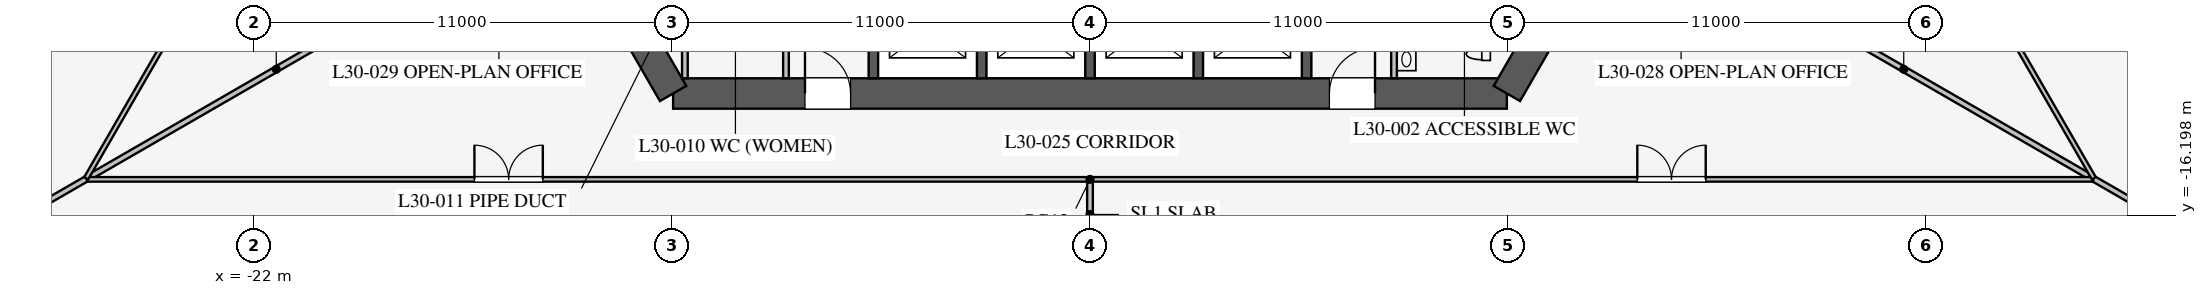
"""IFC4 building model, lengths in metres.
Left out: names, types, materials, properties, quantities, classifications, styles, units other than length and angle.
Written with IfcOpenShell. Run it as: python <this file> out.ifc"""

import sys

from ifc_helpers import new_model, si_unit, direction, frame, frame_2d, origin, place, context, subcontext, project, spatial, rectangle, extrude, element, fill, save


model = new_model("IFC4")
c1 = context("Model", 3, precision=1e-05, world=origin(), true_north=direction((0.0, 1.0)))
c2 = subcontext(c1, "Body", "Model", "MODEL_VIEW")
j1 = project(units=[si_unit("LENGTHUNIT", "METRE"), si_unit("PLANEANGLEUNIT", "RADIAN")], contexts=[c1])
p1 = place(None, origin())
s1 = spatial("IfcSite", under=j1, at=p1, CompositionType="ELEMENT")
p2 = place(p1, origin())
s2 = spatial("IfcBuilding", under=s1, at=p2, CompositionType="ELEMENT")
p3 = place(p2, frame((0.0, 0.0, 132.5)))
s3 = spatial("IfcBuildingStorey", under=s2, at=p3, CompositionType="ELEMENT", Elevation=132.5)
p4 = place(p3, frame((-10.97, -13.0, 0.0), z_axis=(0.0, 0.0, 1.0), x_axis=(1.0, 0.0, 0.0)))
e1 = element("IfcWall", 1, at=p4, inside=s3, PredefinedType="SHEAR", context=c2, shape_type="SweptSolid", body=[
    extrude(rectangle(XDim=21.939, YDim=0.8, at=frame_2d((10.97, 0.0))), origin(), (0.0, 0.0, 1.0), 4.2),
])
p5 = place(p4, frame((17.27, 0.0, 0.0)))
e2 = element("IfcOpeningElement", 2, at=p5, cuts=e1, PredefinedType="OPENING", context=c2, shape_type="SweptSolid", body=[
    extrude(rectangle(XDim=1.2, YDim=2.1, at=frame_2d((0.6, 1.05))), frame((0.0, 0.41, 0.0), z_axis=(0.0, -1.0, 0.0), x_axis=(1.0, 0.0, 0.0)), (0.0, 0.0, 1.0), 0.82),
])
p6 = place(p4, frame((3.47, 0.0, 0.0)))
e3 = element("IfcOpeningElement", 3, at=p6, cuts=e1, PredefinedType="OPENING", context=c2, shape_type="SweptSolid", body=[
    extrude(rectangle(XDim=1.2, YDim=2.1, at=frame_2d((0.6, 1.05))), frame((0.0, 0.41, 0.0), z_axis=(0.0, -1.0, 0.0), x_axis=(1.0, 0.0, 0.0)), (0.0, 0.0, 1.0), 0.82),
])
for number, where, z_axis, x_axis in (
    (4, (10.97, -13.0, 0.0), (0.0, 0.0, 1.0), (0.5, 0.866, 0.0)),
    (5, (-16.743, -3.0, 0.0), (0.0, 0.0, 1.0), (0.5, -0.866, 0.0)),
):
    element("IfcWall", number, at=place(p3, frame(where, z_axis=z_axis, x_axis=x_axis)), inside=s3, PredefinedType="SHEAR", context=c2, shape_type="SweptSolid", body=[
        extrude(rectangle(XDim=11.547, YDim=0.8, at=frame_2d((5.773, 0.0))), origin(), (0.0, 0.0, 1.0), 4.2),
    ])
for number, where, z_axis, x_axis in (
    (6, (-5.7, -10.025, 0.0), (0.0, 0.0, 1.0), (0.0, -1.0, 0.0)),
    (7, (-2.85, -10.025, 0.0), (0.0, 0.0, 1.0), (0.0, -1.0, 0.0)),
    (8, (0.0, -10.025, 0.0), (0.0, 0.0, 1.0), (0.0, -1.0, 0.0)),
    (9, (2.85, -10.025, 0.0), (0.0, 0.0, 1.0), (0.0, -1.0, 0.0)),
    (10, (5.7, -10.025, 0.0), (0.0, 0.0, 1.0), (0.0, -1.0, 0.0)),
):
    element("IfcWall", number, at=place(p3, frame(where, z_axis=z_axis, x_axis=x_axis)), inside=s3, PredefinedType="SHEAR", context=c2, shape_type="SweptSolid", body=[
        extrude(rectangle(XDim=2.575, YDim=0.25, at=frame_2d((1.288, 0.0))), origin(), (0.0, 0.0, 1.0), 4.2),
    ])
p7 = place(p3, frame((8.0, -7.5, 0.0), z_axis=(0.0, 0.0, 1.0), x_axis=(0.0, -1.0, 0.0)))
e11 = element("IfcWall", 11, at=p7, inside=s3, PredefinedType="PARTITIONING", context=c2, shape_type="SweptSolid", body=[
    extrude(rectangle(XDim=5.1, YDim=0.15, at=frame_2d((2.55, 0.0))), origin(), (0.0, 0.0, 1.0), 4.0),
])
p8 = place(p7, frame((2.6, 0.0, 0.0)))
e12 = element("IfcOpeningElement", 12, at=p8, cuts=e11, PredefinedType="OPENING", context=c2, shape_type="SweptSolid", body=[
    extrude(rectangle(XDim=0.9, YDim=2.1, at=frame_2d((0.45, 1.05))), frame((0.0, 0.085, 0.0), z_axis=(0.0, -1.0, 0.0), x_axis=(1.0, 0.0, 0.0)), (0.0, 0.0, 1.0), 0.17),
])
p9 = place(p3, frame((-8.0, -7.5, 0.0), z_axis=(0.0, 0.0, 1.0), x_axis=(0.0, -1.0, 0.0)))
e13 = element("IfcWall", 13, at=p9, inside=s3, PredefinedType="PARTITIONING", context=c2, shape_type="SweptSolid", body=[
    extrude(rectangle(XDim=5.1, YDim=0.15, at=frame_2d((2.55, 0.0))), origin(), (0.0, 0.0, 1.0), 4.0),
])
p10 = place(p9, frame((2.6, 0.0, 0.0)))
e14 = element("IfcOpeningElement", 14, at=p10, cuts=e13, PredefinedType="OPENING", context=c2, shape_type="SweptSolid", body=[
    extrude(rectangle(XDim=0.9, YDim=2.1, at=frame_2d((0.45, 1.05))), frame((0.0, 0.085, 0.0), z_axis=(0.0, -1.0, 0.0), x_axis=(1.0, 0.0, 0.0)), (0.0, 0.0, 1.0), 0.17),
])
p11 = place(p3, frame((-10.66, -8.5, 0.0), z_axis=(0.0, 0.0, 1.0), x_axis=(0.0, -1.0, 0.0)))
e15 = element("IfcWall", 15, at=p11, inside=s3, PredefinedType="PARTITIONING", context=c2, shape_type="SweptSolid", body=[
    extrude(rectangle(XDim=4.1, YDim=0.15, at=frame_2d((2.05, 0.0))), origin(), (0.0, 0.0, 1.0), 4.0),
])
for number, where, z_axis, x_axis in (
    (16, (14.203, -8.2, 0.0), (0.0, 0.0, 1.0), (0.866, -0.5, 0.0)),
    (17, (-14.203, -8.2, 0.0), (0.0, 0.0, 1.0), (-0.866, -0.5, 0.0)),
):
    element("IfcWall", number, at=place(p3, frame(where, z_axis=z_axis, x_axis=x_axis)), inside=s3, PredefinedType="PARTITIONING", context=c2, shape_type="SweptSolid", body=[
        extrude(rectangle(XDim=16.65, YDim=0.15, at=frame_2d((8.325, 0.0))), origin(), (0.0, 0.0, 1.0), 2.3),
    ])
p12 = place(p3, frame((0.0, -15.32, 0.0), z_axis=(0.0, 0.0, 1.0), x_axis=(0.0, -1.0, 0.0)))
e18 = element("IfcWall", 18, at=p12, inside=s3, PredefinedType="PARTITIONING", context=c2, shape_type="SweptSolid", body=[
    extrude(rectangle(XDim=9.65, YDim=0.15, at=frame_2d((4.825, 0.0))), origin(), (0.0, 0.0, 1.0), 3.2),
])
p13 = place(p3, frame((-26.398, -15.26, 0.0), z_axis=(0.0, 0.0, 1.0), x_axis=(1.0, 0.0, 0.0)))
e19 = element("IfcWall", 19, at=p13, inside=s3, PredefinedType="PARTITIONING", context=c2, shape_type="SweptSolid", body=[
    extrude(rectangle(XDim=52.796, YDim=0.12, at=frame_2d((26.398, 0.0))), origin(), (0.0, 0.0, 1.0), 2.9),
])
p14 = place(p13, frame((10.2, 0.0, 0.15)))
e20 = element("IfcOpeningElement", 20, at=p14, cuts=e19, PredefinedType="OPENING", context=c2, shape_type="SweptSolid", body=[
    extrude(rectangle(XDim=1.8, YDim=2.1, at=frame_2d((0.9, 1.05))), frame((0.0, 0.07, 0.0), z_axis=(0.0, -1.0, 0.0), x_axis=(1.0, 0.0, 0.0)), (0.0, 0.0, 1.0), 0.14),
])
p15 = place(p13, frame((40.8, 0.0, 0.15)))
e21 = element("IfcOpeningElement", 21, at=p15, cuts=e19, PredefinedType="OPENING", context=c2, shape_type="SweptSolid", body=[
    extrude(rectangle(XDim=1.8, YDim=2.1, at=frame_2d((0.9, 1.05))), frame((0.0, 0.07, 0.0), z_axis=(0.0, -1.0, 0.0), x_axis=(1.0, 0.0, 0.0)), (0.0, 0.0, 1.0), 0.14),
])
p16 = place(p3, frame((26.415, -15.231, 0.0), z_axis=(0.0, 0.0, 1.0), x_axis=(-0.50000091641, 0.866024874695, 0.0)))
e22 = element("IfcWall", 22, at=p16, inside=s3, PredefinedType="PARTITIONING", context=c2, shape_type="SweptSolid", body=[
    extrude(rectangle(XDim=52.796, YDim=0.12, at=frame_2d((26.398, 0.0))), origin(), (0.0, 0.0, 1.0), 2.9),
])
p17 = place(p16, frame((10.2, 0.0, 0.15)))
e23 = element("IfcOpeningElement", 23, at=p17, cuts=e22, PredefinedType="OPENING", context=c2, shape_type="SweptSolid", body=[
    extrude(rectangle(XDim=1.8, YDim=2.1, at=frame_2d((0.9, 1.05))), frame((0.0, 0.07, 0.0), z_axis=(0.0, -1.0, 0.0), x_axis=(1.0, 0.0, 0.0)), (0.0, 0.0, 1.0), 0.14),
])
p18 = place(p16, frame((40.8, 0.0, 0.15)))
e24 = element("IfcOpeningElement", 24, at=p18, cuts=e22, PredefinedType="OPENING", context=c2, shape_type="SweptSolid", body=[
    extrude(rectangle(XDim=1.8, YDim=2.1, at=frame_2d((0.9, 1.05))), frame((0.0, 0.07, 0.0), z_axis=(0.0, -1.0, 0.0), x_axis=(1.0, 0.0, 0.0)), (0.0, 0.0, 1.0), 0.14),
])
p19 = place(p3, frame((-0.016, 30.491, 0.0), z_axis=(0.0, 0.0, 1.0), x_axis=(-0.50000091641, -0.866024874695, 0.0)))
e25 = element("IfcWall", 25, at=p19, inside=s3, PredefinedType="PARTITIONING", context=c2, shape_type="SweptSolid", body=[
    extrude(rectangle(XDim=52.796, YDim=0.12, at=frame_2d((26.398, 0.0))), origin(), (0.0, 0.0, 1.0), 2.9),
])
p20 = place(p19, frame((10.2, 0.0, 0.15)))
e26 = element("IfcOpeningElement", 26, at=p20, cuts=e25, PredefinedType="OPENING", context=c2, shape_type="SweptSolid", body=[
    extrude(rectangle(XDim=1.8, YDim=2.1, at=frame_2d((0.9, 1.05))), frame((0.0, 0.07, 0.0), z_axis=(0.0, -1.0, 0.0), x_axis=(1.0, 0.0, 0.0)), (0.0, 0.0, 1.0), 0.14),
])
p21 = place(p19, frame((40.8, 0.0, 0.15)))
e27 = element("IfcOpeningElement", 27, at=p21, cuts=e25, PredefinedType="OPENING", context=c2, shape_type="SweptSolid", body=[
    extrude(rectangle(XDim=1.8, YDim=2.1, at=frame_2d((0.9, 1.05))), frame((0.0, 0.07, 0.0), z_axis=(0.0, -1.0, 0.0), x_axis=(1.0, 0.0, 0.0)), (0.0, 0.0, 1.0), 0.14),
])
p22 = place(p5, origin())
e28 = element("IfcDoor", 28, at=p22, inside=s3, OperationType="SINGLE_SWING_RIGHT", PredefinedType="DOOR", context=c2, shape_type="SweptSolid", body=[
    extrude(rectangle(XDim=1.2, YDim=2.1, at=frame_2d((0.6, 1.05))), frame((0.0, 0.025, 0.0), z_axis=(0.0, -1.0, 0.0), x_axis=(1.0, 0.0, 0.0)), (0.0, 0.0, 1.0), 0.05),
])
fill(e2, e28)
p23 = place(p6, origin())
e29 = element("IfcDoor", 29, at=p23, inside=s3, OperationType="SINGLE_SWING_LEFT", PredefinedType="DOOR", context=c2, shape_type="SweptSolid", body=[
    extrude(rectangle(XDim=1.2, YDim=2.1, at=frame_2d((0.6, 1.05))), frame((0.0, 0.025, 0.0), z_axis=(0.0, -1.0, 0.0), x_axis=(1.0, 0.0, 0.0)), (0.0, 0.0, 1.0), 0.05),
])
fill(e3, e29)
p24 = place(p14, origin())
e30 = element("IfcDoor", 30, at=p24, inside=s3, OperationType="DOUBLE_DOOR_SINGLE_SWING", PredefinedType="DOOR", context=c2, shape_type="SweptSolid", body=[
    extrude(rectangle(XDim=1.8, YDim=2.1, at=frame_2d((0.9, 1.05))), frame((0.0, 0.025, 0.0), z_axis=(0.0, -1.0, 0.0), x_axis=(1.0, 0.0, 0.0)), (0.0, 0.0, 1.0), 0.05),
])
fill(e20, e30)
p25 = place(p15, origin())
e31 = element("IfcDoor", 31, at=p25, inside=s3, OperationType="DOUBLE_DOOR_SINGLE_SWING", PredefinedType="DOOR", context=c2, shape_type="SweptSolid", body=[
    extrude(rectangle(XDim=1.8, YDim=2.1, at=frame_2d((0.9, 1.05))), frame((0.0, 0.025, 0.0), z_axis=(0.0, -1.0, 0.0), x_axis=(1.0, 0.0, 0.0)), (0.0, 0.0, 1.0), 0.05),
])
fill(e21, e31)
save(model, sys.argv[1])
